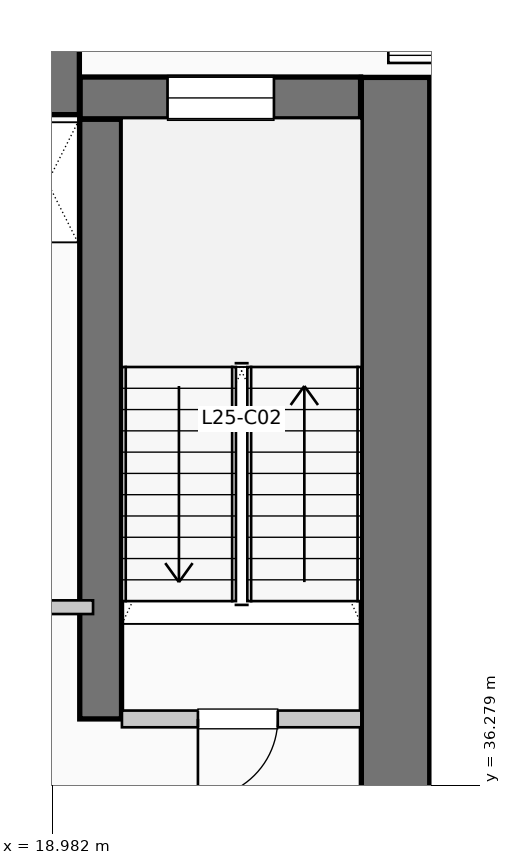
"""IFC4 building model, lengths in metres.
Left out: names, types, materials, properties, quantities, classifications, styles, units other than length and angle.
Written with IfcOpenShell. Run it as: python <this file> out.ifc"""

import sys

from ifc_helpers import new_model, si_unit, direction, frame, frame_2d, origin, place, context, subcontext, project, spatial, rectangle, extrude, element, fill, save


model = new_model("IFC4")
c1 = context("Model", 3, precision=1e-05, world=origin(), true_north=direction((0.0, 1.0)))
c2 = subcontext(c1, "Body", "Model", "MODEL_VIEW")
j1 = project(units=[si_unit("LENGTHUNIT", "METRE"), si_unit("PLANEANGLEUNIT", "RADIAN")], contexts=[c1])
p1 = place(None, origin())
s1 = spatial("IfcSite", under=j1, at=p1, CompositionType="ELEMENT")
p2 = place(p1, origin())
s2 = spatial("IfcBuilding", under=s1, at=p2, CompositionType="ELEMENT")
p3 = place(p2, frame((0.0, 0.0, 106.59)))
s3 = spatial("IfcBuildingStorey", under=s2, at=p3, CompositionType="ELEMENT", Elevation=106.59)
p4 = place(p3, frame((5.36, 45.55, 0.0), z_axis=(0.0, 0.0, 1.0), x_axis=(1.0, 0.0, 0.0)))
e1 = element("IfcWall", 1, at=p4, inside=s3, PredefinedType="SHEAR", context=c2, shape_type="SweptSolid", body=[
    extrude(rectangle(XDim=13.98, YDim=0.9, at=frame_2d((6.99, 0.0))), origin(), (0.0, 0.0, 1.0), 3.96),
])
p5 = place(p3, frame((23.5, 34.95, 0.0), z_axis=(0.0, 0.0, 1.0), x_axis=(0.0, 1.0, 0.0)))
e2 = element("IfcWall", 2, at=p5, inside=s3, PredefinedType="SHEAR", context=c2, shape_type="SweptSolid", body=[
    extrude(rectangle(XDim=10.64, YDim=0.9, at=frame_2d((5.32, 0.0))), origin(), (0.0, 0.0, 1.0), 3.96),
])
p6 = place(p3, frame((19.62, 37.15, 0.0), z_axis=(0.0, 0.0, 1.0), x_axis=(0.0, 1.0, 0.0)))
e3 = element("IfcWall", 3, at=p6, inside=s3, PredefinedType="SHEAR", context=c2, shape_type="SweptSolid", body=[
    extrude(rectangle(XDim=7.89, YDim=0.55, at=frame_2d((3.945, 0.0))), origin(), (0.0, 0.0, 1.0), 3.96),
])
p7 = place(p3, frame((19.35, 45.32, 0.0), z_axis=(0.0, 0.0, 1.0), x_axis=(1.0, 0.0, 0.0)))
e4 = element("IfcWall", 4, at=p7, inside=s3, PredefinedType="SHEAR", context=c2, shape_type="SweptSolid", body=[
    extrude(rectangle(XDim=3.69, YDim=0.55, at=frame_2d((1.845, 0.0))), origin(), (0.0, 0.0, 1.0), 3.96),
])
p8 = place(p7, frame((1.15, 0.0, 1.05)))
e5 = element("IfcOpeningElement", 5, at=p8, cuts=e4, PredefinedType="OPENING", context=c2, shape_type="SweptSolid", body=[
    extrude(rectangle(XDim=1.4, YDim=1.8, at=frame_2d((0.7, 0.9))), frame((0.0, 0.285, 0.0), z_axis=(0.0, -1.0, 0.0), x_axis=(1.0, 0.0, 0.0)), (0.0, 0.0, 1.0), 0.57),
])
p9 = place(p3, frame((19.9, 37.15, 0.0), z_axis=(0.0, 0.0, 1.0), x_axis=(1.0, 0.0, 0.0)))
e6 = element("IfcWall", 6, at=p9, inside=s3, PredefinedType="PARTITIONING", context=c2, shape_type="SweptSolid", body=[
    extrude(rectangle(XDim=3.15, YDim=0.22, at=frame_2d((1.575, 0.0))), origin(), (0.0, 0.0, 1.0), 3.71),
])
p10 = place(p9, frame((2.05, 0.0, 0.0), z_axis=(0.0, 0.0, 1.0), x_axis=(-1.0, 0.0, 0.0)))
e7 = element("IfcOpeningElement", 7, at=p10, cuts=e6, PredefinedType="OPENING", context=c2, shape_type="SweptSolid", body=[
    extrude(rectangle(XDim=1.05, YDim=2.15, at=frame_2d((0.525, 1.075))), frame((0.0, 0.12, 0.0), z_axis=(0.0, -1.0, 0.0), x_axis=(1.0, 0.0, 0.0)), (0.0, 0.0, 1.0), 0.24),
])
p11 = place(p3, frame((17.68, 38.62, 0.0), z_axis=(0.0, 0.0, 1.0), x_axis=(1.0, 0.0, 0.0)))
e8 = element("IfcWall", 8, at=p11, inside=s3, PredefinedType="PARTITIONING", context=c2, shape_type="SweptSolid", body=[
    extrude(rectangle(XDim=1.84, YDim=0.18, at=frame_2d((0.92, 0.0))), origin(), (0.0, 0.0, 1.0), 3.71),
])
p12 = place(p11, frame((0.24, 0.0, 0.0)))
e9 = element("IfcOpeningElement", 9, at=p12, cuts=e8, PredefinedType="OPENING", context=c2, shape_type="SweptSolid", body=[
    extrude(rectangle(XDim=0.92, YDim=2.1, at=frame_2d((0.46, 1.05))), frame((0.0, 0.1, 0.0), z_axis=(0.0, -1.0, 0.0), x_axis=(1.0, 0.0, 0.0)), (0.0, 0.0, 1.0), 0.2),
])
p13 = place(p8, origin())
e10 = element("IfcWindow", 10, at=p13, inside=s3, PartitioningType="SINGLE_PANEL", PredefinedType="WINDOW", context=c2, shape_type="SweptSolid", body=[
    extrude(rectangle(XDim=1.4, YDim=1.8, at=frame_2d((0.7, 0.9))), frame((0.0, 0.03, 0.0), z_axis=(0.0, -1.0, 0.0), x_axis=(1.0, 0.0, 0.0)), (0.0, 0.0, 1.0), 0.06),
])
fill(e5, e10)
p14 = place(p10, origin())
e11 = element("IfcDoor", 11, at=p14, inside=s3, OperationType="SINGLE_SWING_LEFT", PredefinedType="DOOR", context=c2, shape_type="SweptSolid", body=[
    extrude(rectangle(XDim=1.05, YDim=2.15, at=frame_2d((0.525, 1.075))), frame((0.0, 0.025, 0.0), z_axis=(0.0, -1.0, 0.0), x_axis=(1.0, 0.0, 0.0)), (0.0, 0.0, 1.0), 0.05),
])
fill(e7, e11)
save(model, sys.argv[1])
